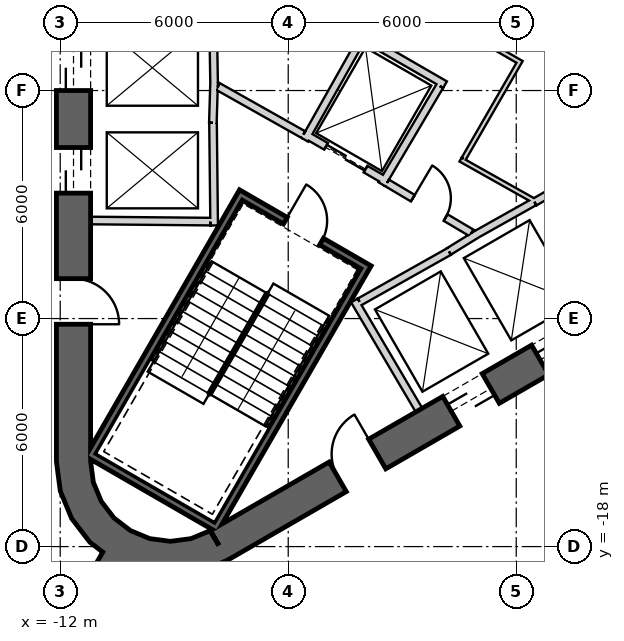
"""IFC4 building model, lengths in metres.
Left out: names, types, materials, properties, quantities, classifications, styles, units other than length and angle.
Written with IfcOpenShell. Run it as: python <this file> out.ifc"""

import sys

from ifc_helpers import new_model, si_unit, direction, frame, frame_2d, origin, place, context, subcontext, project, spatial, polyline, rectangle, outline, extrude, element, fill, save


model = new_model("IFC4")
c1 = context("Model", 3, precision=1e-05, world=origin(), true_north=direction((0.0, 1.0)))
c2 = subcontext(c1, "Body", "Model", "MODEL_VIEW")
j1 = project(units=[si_unit("LENGTHUNIT", "METRE"), si_unit("PLANEANGLEUNIT", "RADIAN")], contexts=[c1])
p1 = place(None, origin())
s1 = spatial("IfcSite", under=j1, at=p1, CompositionType="ELEMENT")
p2 = place(p1, origin())
s2 = spatial("IfcBuilding", under=s1, at=p2, CompositionType="ELEMENT")
p3 = place(p2, frame((0.0, 0.0, 217.2)))
s3 = spatial("IfcBuildingStorey", under=s2, at=p3, CompositionType="ELEMENT", Elevation=217.2)
p4 = place(p3, frame((-11.65, 15.762, 0.0), z_axis=(0.0, 0.0, 1.0), x_axis=(0.0, -1.0, 0.0)))
e1 = element("IfcWall", 1, at=p4, inside=s3, PredefinedType="SHEAR", context=c2, shape_type="SweptSolid", body=[
    extrude(rectangle(XDim=31.523, YDim=0.9, at=frame_2d((15.762, 0.0))), origin(), (0.0, 0.0, 1.0), 4.0),
])
p5 = place(p4, frame((7.062, 0.0, 0.0)))
e2 = element("IfcOpeningElement", 2, at=p5, cuts=e1, PredefinedType="OPENING", context=c2, shape_type="SweptSolid", body=[
    extrude(rectangle(XDim=1.2, YDim=2.4, at=frame_2d((0.6, 1.2))), frame((0.0, 0.46, 0.0), z_axis=(0.0, -1.0, 0.0), x_axis=(1.0, 0.0, 0.0)), (0.0, 0.0, 1.0), 0.92),
])
p6 = place(p4, frame((9.762, 0.0, 0.0)))
e3 = element("IfcOpeningElement", 3, at=p6, cuts=e1, PredefinedType="OPENING", context=c2, shape_type="SweptSolid", body=[
    extrude(rectangle(XDim=1.2, YDim=2.4, at=frame_2d((0.6, 1.2))), frame((0.0, 0.46, 0.0), z_axis=(0.0, -1.0, 0.0), x_axis=(1.0, 0.0, 0.0)), (0.0, 0.0, 1.0), 0.92),
])
p7 = place(p4, frame((12.462, 0.0, 0.0)))
e4 = element("IfcOpeningElement", 4, at=p7, cuts=e1, PredefinedType="OPENING", context=c2, shape_type="SweptSolid", body=[
    extrude(rectangle(XDim=1.2, YDim=2.4, at=frame_2d((0.6, 1.2))), frame((0.0, 0.46, 0.0), z_axis=(0.0, -1.0, 0.0), x_axis=(1.0, 0.0, 0.0)), (0.0, 0.0, 1.0), 0.92),
])
p8 = place(p4, frame((15.162, 0.0, 0.0)))
e5 = element("IfcOpeningElement", 5, at=p8, cuts=e1, PredefinedType="OPENING", context=c2, shape_type="SweptSolid", body=[
    extrude(rectangle(XDim=1.2, YDim=2.4, at=frame_2d((0.6, 1.2))), frame((0.0, 0.46, 0.0), z_axis=(0.0, -1.0, 0.0), x_axis=(1.0, 0.0, 0.0)), (0.0, 0.0, 1.0), 0.92),
])
p9 = place(p4, frame((17.862, 0.0, 0.0)))
e6 = element("IfcOpeningElement", 6, at=p9, cuts=e1, PredefinedType="OPENING", context=c2, shape_type="SweptSolid", body=[
    extrude(rectangle(XDim=1.2, YDim=2.4, at=frame_2d((0.6, 1.2))), frame((0.0, 0.46, 0.0), z_axis=(0.0, -1.0, 0.0), x_axis=(1.0, 0.0, 0.0)), (0.0, 0.0, 1.0), 0.92),
])
p10 = place(p4, frame((20.562, 0.0, 0.0)))
e7 = element("IfcOpeningElement", 7, at=p10, cuts=e1, PredefinedType="OPENING", context=c2, shape_type="SweptSolid", body=[
    extrude(rectangle(XDim=1.2, YDim=2.4, at=frame_2d((0.6, 1.2))), frame((0.0, 0.46, 0.0), z_axis=(0.0, -1.0, 0.0), x_axis=(1.0, 0.0, 0.0)), (0.0, 0.0, 1.0), 0.92),
])
p11 = place(p4, frame((23.262, 0.0, 0.0)))
e8 = element("IfcOpeningElement", 8, at=p11, cuts=e1, PredefinedType="OPENING", context=c2, shape_type="SweptSolid", body=[
    extrude(rectangle(XDim=1.2, YDim=2.4, at=frame_2d((0.6, 1.2))), frame((0.0, 0.46, 0.0), z_axis=(0.0, -1.0, 0.0), x_axis=(1.0, 0.0, 0.0)), (0.0, 0.0, 1.0), 0.92),
])
p12 = place(p4, frame((3.612, 0.0, 0.0)))
e9 = element("IfcOpeningElement", 9, at=p12, cuts=e1, PredefinedType="OPENING", context=c2, shape_type="SweptSolid", body=[
    extrude(rectangle(XDim=1.2, YDim=2.4, at=frame_2d((0.6, 1.2))), frame((0.0, 0.46, 0.0), z_axis=(0.0, -1.0, 0.0), x_axis=(1.0, 0.0, 0.0)), (0.0, 0.0, 1.0), 0.92),
])
p13 = place(p4, frame((26.712, 0.0, 0.0)))
e10 = element("IfcOpeningElement", 10, at=p13, cuts=e1, PredefinedType="OPENING", context=c2, shape_type="SweptSolid", body=[
    extrude(rectangle(XDim=1.2, YDim=2.4, at=frame_2d((0.6, 1.2))), frame((0.0, 0.46, 0.0), z_axis=(0.0, -1.0, 0.0), x_axis=(1.0, 0.0, 0.0)), (0.0, 0.0, 1.0), 0.92),
])
p14 = place(p3, frame((-7.825, -17.97, 0.0), z_axis=(0.0, 0.0, 1.0), x_axis=(0.866028369851, 0.499994862586, 0.0)))
e11 = element("IfcWall", 11, at=p14, inside=s3, PredefinedType="SHEAR", context=c2, shape_type="SweptSolid", body=[
    extrude(rectangle(XDim=31.523, YDim=0.9, at=frame_2d((15.762, 0.0))), origin(), (0.0, 0.0, 1.0), 4.0),
])
p15 = place(p14, frame((7.062, 0.0, 0.0)))
e12 = element("IfcOpeningElement", 12, at=p15, cuts=e11, PredefinedType="OPENING", context=c2, shape_type="SweptSolid", body=[
    extrude(rectangle(XDim=1.2, YDim=2.4, at=frame_2d((0.6, 1.2))), frame((0.0, 0.46, 0.0), z_axis=(0.0, -1.0, 0.0), x_axis=(1.0, 0.0, 0.0)), (0.0, 0.0, 1.0), 0.92),
])
p16 = place(p14, frame((9.762, 0.0, 0.0)))
e13 = element("IfcOpeningElement", 13, at=p16, cuts=e11, PredefinedType="OPENING", context=c2, shape_type="SweptSolid", body=[
    extrude(rectangle(XDim=1.2, YDim=2.4, at=frame_2d((0.6, 1.2))), frame((0.0, 0.46, 0.0), z_axis=(0.0, -1.0, 0.0), x_axis=(1.0, 0.0, 0.0)), (0.0, 0.0, 1.0), 0.92),
])
p17 = place(p14, frame((12.462, 0.0, 0.0)))
e14 = element("IfcOpeningElement", 14, at=p17, cuts=e11, PredefinedType="OPENING", context=c2, shape_type="SweptSolid", body=[
    extrude(rectangle(XDim=1.2, YDim=2.4, at=frame_2d((0.6, 1.2))), frame((0.0, 0.46, 0.0), z_axis=(0.0, -1.0, 0.0), x_axis=(1.0, 0.0, 0.0)), (0.0, 0.0, 1.0), 0.92),
])
p18 = place(p14, frame((15.162, 0.0, 0.0)))
e15 = element("IfcOpeningElement", 15, at=p18, cuts=e11, PredefinedType="OPENING", context=c2, shape_type="SweptSolid", body=[
    extrude(rectangle(XDim=1.2, YDim=2.4, at=frame_2d((0.6, 1.2))), frame((0.0, 0.46, 0.0), z_axis=(0.0, -1.0, 0.0), x_axis=(1.0, 0.0, 0.0)), (0.0, 0.0, 1.0), 0.92),
])
p19 = place(p14, frame((17.862, 0.0, 0.0)))
e16 = element("IfcOpeningElement", 16, at=p19, cuts=e11, PredefinedType="OPENING", context=c2, shape_type="SweptSolid", body=[
    extrude(rectangle(XDim=1.2, YDim=2.4, at=frame_2d((0.6, 1.2))), frame((0.0, 0.46, 0.0), z_axis=(0.0, -1.0, 0.0), x_axis=(1.0, 0.0, 0.0)), (0.0, 0.0, 1.0), 0.92),
])
p20 = place(p14, frame((20.562, 0.0, 0.0)))
e17 = element("IfcOpeningElement", 17, at=p20, cuts=e11, PredefinedType="OPENING", context=c2, shape_type="SweptSolid", body=[
    extrude(rectangle(XDim=1.2, YDim=2.4, at=frame_2d((0.6, 1.2))), frame((0.0, 0.46, 0.0), z_axis=(0.0, -1.0, 0.0), x_axis=(1.0, 0.0, 0.0)), (0.0, 0.0, 1.0), 0.92),
])
p21 = place(p14, frame((26.712, 0.0, 0.0)))
e18 = element("IfcOpeningElement", 18, at=p21, cuts=e11, PredefinedType="OPENING", context=c2, shape_type="SweptSolid", body=[
    extrude(rectangle(XDim=1.2, YDim=2.4, at=frame_2d((0.6, 1.2))), frame((0.0, 0.46, 0.0), z_axis=(0.0, -1.0, 0.0), x_axis=(1.0, 0.0, 0.0)), (0.0, 0.0, 1.0), 0.92),
])
p22 = place(p14, frame((3.612, 0.0, 0.0)))
e19 = element("IfcOpeningElement", 19, at=p22, cuts=e11, PredefinedType="OPENING", context=c2, shape_type="SweptSolid", body=[
    extrude(rectangle(XDim=1.2, YDim=2.4, at=frame_2d((0.6, 1.2))), frame((0.0, 0.46, 0.0), z_axis=(0.0, -1.0, 0.0), x_axis=(1.0, 0.0, 0.0)), (0.0, 0.0, 1.0), 0.92),
])
p23 = place(p3, origin())
e20 = element("IfcWall", 20, at=p23, inside=s3, PredefinedType="SHEAR", context=c2, shape_type="SweptSolid", body=[
    extrude(outline(polyline([(-12.1, -15.762), (-11.998, -16.538), (-11.698, -17.262), (-11.221, -17.883), (-10.6, -18.36), (-9.876, -18.659), (-9.1, -18.762), (-8.323, -18.659), (-7.6, -18.36), (-8.05, -17.58), (-8.556, -17.79), (-9.1, -17.862), (-9.644, -17.79), (-10.15, -17.58), (-10.585, -17.247), (-10.919, -16.812), (-11.128, -16.305), (-11.2, -15.762), (-12.1, -15.762)])), origin(), (0.0, 0.0, 1.0), 4.0),
])
p24 = place(p3, frame((-10.575, -18.316, 0.0), z_axis=(0.0, 0.0, 1.0), x_axis=(-0.499998001389, -0.86602655768, 0.0)))
e21 = element("IfcWall", 21, at=p24, inside=s3, PredefinedType="SHEAR", context=c2, shape_type="SweptSolid", body=[
    extrude(rectangle(XDim=11.581, YDim=0.7, at=frame_2d((5.791, 0.0))), origin(), (0.0, 0.0, 1.0), 4.0),
])
p25 = place(p3, frame((-7.95, -5.772, 0.0), z_axis=(0.0, 0.0, 1.0), x_axis=(-0.030803413295, -0.999525462272, 0.0)))
e22 = element("IfcWall", 22, at=p25, inside=s3, PredefinedType="PLUMBINGWALL", context=c2, shape_type="SweptSolid", body=[
    extrude(rectangle(XDim=1.078, YDim=0.2, at=frame_2d((0.539, 0.0))), origin(), (0.0, 0.0, 1.0), 3.7),
])
p26 = place(p3, frame((-7.98, -4.05, 0.0), z_axis=(0.0, 0.0, 1.0), x_axis=(0.016809909365, -0.999858703491, 0.0)))
e23 = element("IfcWall", 23, at=p26, inside=s3, PredefinedType="PLUMBINGWALL", context=c2, shape_type="SweptSolid", body=[
    extrude(rectangle(XDim=1.844, YDim=0.2, at=frame_2d((0.922, 0.0))), origin(), (0.0, 0.0, 1.0), 3.7),
])
p27 = place(p3, frame((-7.979, -6.85, 0.0), z_axis=(0.0, 0.0, 1.0), x_axis=(0.011121475088, -0.999938154483, 0.0)))
e24 = element("IfcWall", 24, at=p27, inside=s3, PredefinedType="PLUMBINGWALL", context=c2, shape_type="SweptSolid", body=[
    extrude(rectangle(XDim=2.7, YDim=0.2, at=frame_2d((1.35, 0.0))), origin(), (0.0, 0.0, 1.0), 3.7),
])
p28 = place(p3, frame((-8.05, -9.449, 0.0), z_axis=(0.0, 0.0, 1.0), x_axis=(-0.999957467379, 0.009222983926, 0.0)))
e25 = element("IfcWall", 25, at=p28, inside=s3, PredefinedType="PLUMBINGWALL", context=c2, shape_type="SweptSolid", body=[
    extrude(rectangle(XDim=3.15, YDim=0.2, at=frame_2d((1.575, 0.0))), origin(), (0.0, 0.0, 1.0), 3.7),
])
p29 = place(p3, frame((0.483, -8.936, 0.0), z_axis=(0.0, 0.0, 1.0), x_axis=(0.866030989016, 0.499990325971, 0.0)))
e26 = element("IfcWall", 26, at=p29, inside=s3, PredefinedType="PLUMBINGWALL", context=c2, shape_type="SweptSolid", body=[
    extrude(rectangle(XDim=8.1, YDim=0.2, at=frame_2d((4.05, 0.0))), origin(), (0.0, 0.0, 1.0), 3.7),
])
p30 = place(p3, frame((-2.558, -14.409, 0.0), z_axis=(0.0, 0.0, 1.0), x_axis=(-0.507997497166, 0.861358544901, 0.0)))
e27 = element("IfcWall", 27, at=p30, inside=s3, PredefinedType="PLUMBINGWALL", context=c2, shape_type="SweptSolid", body=[
    extrude(rectangle(XDim=3.35, YDim=0.2, at=frame_2d((1.675, 0.0))), origin(), (0.0, 0.0, 1.0), 3.7),
])
p31 = place(p3, frame((-1.769, -10.237, 0.0), z_axis=(0.0, 0.0, 1.0), x_axis=(-0.871534483978, -0.490334215854, 0.0)))
e28 = element("IfcWall", 28, at=p31, inside=s3, PredefinedType="PLUMBINGWALL", context=c2, shape_type="SweptSolid", body=[
    extrude(rectangle(XDim=2.7, YDim=0.2, at=frame_2d((1.35, 0.0))), origin(), (0.0, 0.0, 1.0), 3.7),
])
p32 = place(p3, frame((-1.024, -9.771, 0.0), z_axis=(0.0, 0.0, 1.0), x_axis=(-0.850348075135, -0.526220629693, 0.0)))
e29 = element("IfcWall", 29, at=p32, inside=s3, PredefinedType="PLUMBINGWALL", context=c2, shape_type="SweptSolid", body=[
    extrude(rectangle(XDim=0.878, YDim=0.2, at=frame_2d((0.439, 0.0))), origin(), (0.0, 0.0, 1.0), 3.7),
])
p33 = place(p3, frame((-1.13, -9.832, 0.0), z_axis=(0.0, 0.0, 1.0), x_axis=(0.871988740738, 0.489525929882, 0.0)))
e30 = element("IfcWall", 30, at=p33, inside=s3, PredefinedType="PLUMBINGWALL", context=c2, shape_type="SweptSolid", body=[
    extrude(rectangle(XDim=1.845, YDim=0.2, at=frame_2d((0.922, 0.0))), origin(), (0.0, 0.0, 1.0), 3.7),
])
p34 = place(p3, frame((-3.905, -10.563, -0.3), z_axis=(0.0, 0.0, 1.0), x_axis=(-0.500012932018, -0.866017937352, 0.0)))
e31 = element("IfcWall", 31, at=p34, inside=s3, PredefinedType="SHEAR", context=c2, shape_type="SweptSolid", body=[
    extrude(rectangle(XDim=8.1, YDim=0.2, at=frame_2d((4.05, 0.0))), origin(), (0.0, 0.0, 1.0), 4.0),
])
p35 = place(p3, frame((-11.282, -15.541, -0.3), z_axis=(0.0, 0.0, 1.0), x_axis=(0.866000483506, -0.500043160704, 0.0)))
e32 = element("IfcWall", 32, at=p35, inside=s3, PredefinedType="SHEAR", context=c2, shape_type="SweptSolid", body=[
    extrude(rectangle(XDim=3.8, YDim=0.2, at=frame_2d((1.9, 0.0))), origin(), (0.0, 0.0, 1.0), 4.0),
])
p36 = place(p3, frame((-7.196, -8.663, -0.3), z_axis=(0.0, 0.0, 1.0), x_axis=(-0.499997992926, -0.866026562566, 0.0)))
e33 = element("IfcWall", 33, at=p36, inside=s3, PredefinedType="SHEAR", context=c2, shape_type="SweptSolid", body=[
    extrude(rectangle(XDim=7.9, YDim=0.2, at=frame_2d((3.95, 0.0))), origin(), (0.0, 0.0, 1.0), 4.0),
])
p37 = place(p3, frame((-4.041, -10.599, -0.3), z_axis=(0.0, 0.0, 1.0), x_axis=(-0.866047807691, 0.499961193289, 0.0)))
e34 = element("IfcWall", 34, at=p37, inside=s3, PredefinedType="SHEAR", context=c2, shape_type="SweptSolid", body=[
    extrude(rectangle(XDim=3.6, YDim=0.2, at=frame_2d((1.8, 0.0))), origin(), (0.0, 0.0, 1.0), 4.0),
])
p38 = place(p37, frame((1.25, 0.0, 0.3)))
e35 = element("IfcOpeningElement", 35, at=p38, cuts=e34, PredefinedType="OPENING", context=c2, shape_type="SweptSolid", body=[
    extrude(rectangle(XDim=1.1, YDim=2.1, at=frame_2d((0.55, 1.05))), frame((0.0, 0.11, 0.0), z_axis=(0.0, -1.0, 0.0), x_axis=(1.0, 0.0, 0.0)), (0.0, 0.0, 1.0), 0.22),
])
p39 = place(p3, frame((-3.446, -8.368, 0.0), z_axis=(0.0, 0.0, 1.0), x_axis=(-0.866024647952, 0.500001309137, 0.0)))
e36 = element("IfcWall", 36, at=p39, inside=s3, PredefinedType="PLUMBINGWALL", context=c2, shape_type="SweptSolid", body=[
    extrude(rectangle(XDim=2.4, YDim=0.2, at=frame_2d((1.2, 0.0))), origin(), (0.0, 0.0, 1.0), 3.7),
])
p40 = place(p39, frame((0.6, 0.0, 0.0)))
e37 = element("IfcOpeningElement", 37, at=p40, cuts=e36, PredefinedType="OPENING", context=c2, shape_type="SweptSolid", body=[
    extrude(rectangle(XDim=1.2, YDim=2.4, at=frame_2d((0.6, 1.2))), frame((0.0, 0.11, 0.0), z_axis=(0.0, -1.0, 0.0), x_axis=(1.0, 0.0, 0.0)), (0.0, 0.0, 1.0), 0.22),
])
p41 = place(p3, frame((-5.562, -7.296, 0.0), z_axis=(0.0, 0.0, 1.0), x_axis=(0.491322718731, 0.870977603649, 0.0)))
e38 = element("IfcWall", 38, at=p41, inside=s3, PredefinedType="PLUMBINGWALL", context=c2, shape_type="SweptSolid", body=[
    extrude(rectangle(XDim=3.1, YDim=0.2, at=frame_2d((1.55, 0.0))), origin(), (0.0, 0.0, 1.0), 3.7),
])
p42 = place(p3, frame((-3.892, -4.681, 0.0), z_axis=(0.0, 0.0, 1.0), x_axis=(0.866009305107, -0.50002788269, 0.0)))
e39 = element("IfcWall", 39, at=p42, inside=s3, PredefinedType="PLUMBINGWALL", context=c2, shape_type="SweptSolid", body=[
    extrude(rectangle(XDim=2.329, YDim=0.2, at=frame_2d((1.165, 0.0))), origin(), (0.0, 0.0, 1.0), 3.7),
])
p43 = place(p3, frame((-2.012, -5.882, 0.0), z_axis=(0.0, 0.0, 1.0), x_axis=(-0.508619639323, -0.860991325447, 0.0)))
e40 = element("IfcWall", 40, at=p43, inside=s3, PredefinedType="PLUMBINGWALL", context=c2, shape_type="SweptSolid", body=[
    extrude(rectangle(XDim=3.0, YDim=0.2, at=frame_2d((1.5, 0.0))), origin(), (0.0, 0.0, 1.0), 3.7),
])
p44 = place(p3, frame((-7.849, -5.894, 0.0), z_axis=(0.0, 0.0, 1.0), x_axis=(0.871340486379, -0.490678873396, 0.0)))
e41 = element("IfcWall", 41, at=p44, inside=s3, PredefinedType="PARTITIONING", context=c2, shape_type="SweptSolid", body=[
    extrude(rectangle(XDim=2.581, YDim=0.2, at=frame_2d((1.291, 0.0))), origin(), (0.0, 0.0, 1.0), 3.7),
])
p45 = place(p3, frame((-3.401, -8.43, 0.0), z_axis=(0.0, 0.0, 1.0), x_axis=(0.860598681535, -0.509283721849, 0.0)))
e42 = element("IfcWall", 42, at=p45, inside=s3, PredefinedType="PARTITIONING", context=c2, shape_type="SweptSolid", body=[
    extrude(rectangle(XDim=2.581, YDim=0.2, at=frame_2d((1.291, 0.0))), origin(), (0.0, 0.0, 1.0), 3.7),
])
p46 = place(p45, frame((0.791, 0.0, 0.0)))
e43 = element("IfcOpeningElement", 43, at=p46, cuts=e42, PredefinedType="OPENING", context=c2, shape_type="SweptSolid", body=[
    extrude(rectangle(XDim=1.0, YDim=2.1, at=frame_2d((0.5, 1.05))), frame((0.0, 0.11, 0.0), z_axis=(0.0, -1.0, 0.0), x_axis=(1.0, 0.0, 0.0)), (0.0, 0.0, 1.0), 0.22),
])
p47 = place(p3, frame((-1.464, -7.816, 0.0), z_axis=(0.0, 0.0, 1.0), x_axis=(0.871880202732, -0.489719217597, 0.0)))
e44 = element("IfcWall", 44, at=p47, inside=s3, PredefinedType="PARTITIONING", context=c2, shape_type="SweptSolid", body=[
    extrude(rectangle(XDim=2.224, YDim=0.12, at=frame_2d((1.112, 0.0))), origin(), (0.0, 0.0, 1.0), 3.7),
])
p48 = place(p3, frame((0.118, -5.195, 0.0), z_axis=(0.0, 0.0, 1.0), x_axis=(-0.499990139034, -0.866031096941, 0.0)))
e45 = element("IfcWall", 45, at=p48, inside=s3, PredefinedType="PARTITIONING", context=c2, shape_type="SweptSolid", body=[
    extrude(rectangle(XDim=3.0, YDim=0.12, at=frame_2d((1.5, 0.0))), origin(), (0.0, 0.0, 1.0), 3.7),
])
p49 = place(p3, frame((-1.501, -4.33, 0.0), z_axis=(0.0, 0.0, 1.0), x_axis=(0.866059624469, -0.499940723351, 0.0)))
e46 = element("IfcWall", 46, at=p49, inside=s3, PredefinedType="PARTITIONING", context=c2, shape_type="SweptSolid", body=[
    extrude(rectangle(XDim=1.775, YDim=0.12, at=frame_2d((0.888, 0.0))), origin(), (0.0, 0.0, 1.0), 3.7),
])
p50 = place(p3, frame((-6.019, -23.22, 0.0), z_axis=(0.0, 0.0, 1.0), x_axis=(0.86602143297, 0.50000687759, 0.0)))
e47 = element("IfcWall", 47, at=p50, inside=s3, PredefinedType="PARTITIONING", context=c2, shape_type="SweptSolid", body=[
    extrude(rectangle(XDim=18.873, YDim=0.2, at=frame_2d((9.437, 0.0))), origin(), (0.0, 0.0, 1.0), 2.88),
])
p51 = place(p38, origin())
e48 = element("IfcDoor", 48, at=p51, inside=s3, OperationType="SINGLE_SWING_LEFT", PredefinedType="USERDEFINED", context=c2, shape_type="SweptSolid", body=[
    extrude(rectangle(XDim=1.1, YDim=2.1, at=frame_2d((0.55, 1.05))), frame((0.0, 0.025, 0.0), z_axis=(0.0, -1.0, 0.0), x_axis=(1.0, 0.0, 0.0)), (0.0, 0.0, 1.0), 0.05),
])
fill(e35, e48)
p52 = place(p46, origin())
e49 = element("IfcDoor", 49, at=p52, inside=s3, OperationType="SINGLE_SWING_LEFT", PredefinedType="USERDEFINED", context=c2, shape_type="SweptSolid", body=[
    extrude(rectangle(XDim=1.0, YDim=2.1, at=frame_2d((0.5, 1.05))), frame((0.0, 0.025, 0.0), z_axis=(0.0, -1.0, 0.0), x_axis=(1.0, 0.0, 0.0)), (0.0, 0.0, 1.0), 0.05),
])
fill(e43, e49)
p53 = place(p40, origin())
e50 = element("IfcDoor", 50, at=p53, inside=s3, OperationType="SLIDING_TO_LEFT", PredefinedType="USERDEFINED", context=c2, shape_type="SweptSolid", body=[
    extrude(rectangle(XDim=1.2, YDim=2.4, at=frame_2d((0.6, 1.2))), frame((0.0, 0.025, 0.0), z_axis=(0.0, -1.0, 0.0), x_axis=(1.0, 0.0, 0.0)), (0.0, 0.0, 1.0), 0.05),
])
fill(e37, e50)
p54 = place(p10, origin())
e51 = element("IfcDoor", 51, at=p54, inside=s3, OperationType="SLIDING_TO_LEFT", PredefinedType="USERDEFINED", context=c2, shape_type="SweptSolid", body=[
    extrude(rectangle(XDim=1.2, YDim=2.4, at=frame_2d((0.6, 1.2))), frame((0.0, 0.025, 0.0), z_axis=(0.0, -1.0, 0.0), x_axis=(1.0, 0.0, 0.0)), (0.0, 0.0, 1.0), 0.05),
])
fill(e7, e51)
p55 = place(p11, origin())
e52 = element("IfcDoor", 52, at=p55, inside=s3, OperationType="SLIDING_TO_LEFT", PredefinedType="USERDEFINED", context=c2, shape_type="SweptSolid", body=[
    extrude(rectangle(XDim=1.2, YDim=2.4, at=frame_2d((0.6, 1.2))), frame((0.0, 0.025, 0.0), z_axis=(0.0, -1.0, 0.0), x_axis=(1.0, 0.0, 0.0)), (0.0, 0.0, 1.0), 0.05),
])
fill(e8, e52)
p56 = place(p15, origin())
e53 = element("IfcDoor", 53, at=p56, inside=s3, OperationType="SLIDING_TO_LEFT", PredefinedType="USERDEFINED", context=c2, shape_type="SweptSolid", body=[
    extrude(rectangle(XDim=1.2, YDim=2.4, at=frame_2d((0.6, 1.2))), frame((0.0, 0.025, 0.0), z_axis=(0.0, -1.0, 0.0), x_axis=(1.0, 0.0, 0.0)), (0.0, 0.0, 1.0), 0.05),
])
fill(e12, e53)
p57 = place(p16, origin())
e54 = element("IfcDoor", 54, at=p57, inside=s3, OperationType="SLIDING_TO_LEFT", PredefinedType="USERDEFINED", context=c2, shape_type="SweptSolid", body=[
    extrude(rectangle(XDim=1.2, YDim=2.4, at=frame_2d((0.6, 1.2))), frame((0.0, 0.025, 0.0), z_axis=(0.0, -1.0, 0.0), x_axis=(1.0, 0.0, 0.0)), (0.0, 0.0, 1.0), 0.05),
])
fill(e13, e54)
p58 = place(p13, origin())
e55 = element("IfcDoor", 55, at=p58, inside=s3, OperationType="SINGLE_SWING_LEFT", PredefinedType="USERDEFINED", context=c2, shape_type="SweptSolid", body=[
    extrude(rectangle(XDim=1.2, YDim=2.4, at=frame_2d((0.6, 1.2))), frame((0.0, 0.025, 0.0), z_axis=(0.0, -1.0, 0.0), x_axis=(1.0, 0.0, 0.0)), (0.0, 0.0, 1.0), 0.05),
])
fill(e10, e55)
p59 = place(p22, origin())
e56 = element("IfcDoor", 56, at=p59, inside=s3, OperationType="SINGLE_SWING_LEFT", PredefinedType="USERDEFINED", context=c2, shape_type="SweptSolid", body=[
    extrude(rectangle(XDim=1.2, YDim=2.4, at=frame_2d((0.6, 1.2))), frame((0.0, 0.025, 0.0), z_axis=(0.0, -1.0, 0.0), x_axis=(1.0, 0.0, 0.0)), (0.0, 0.0, 1.0), 0.05),
])
fill(e19, e56)
save(model, sys.argv[1])
